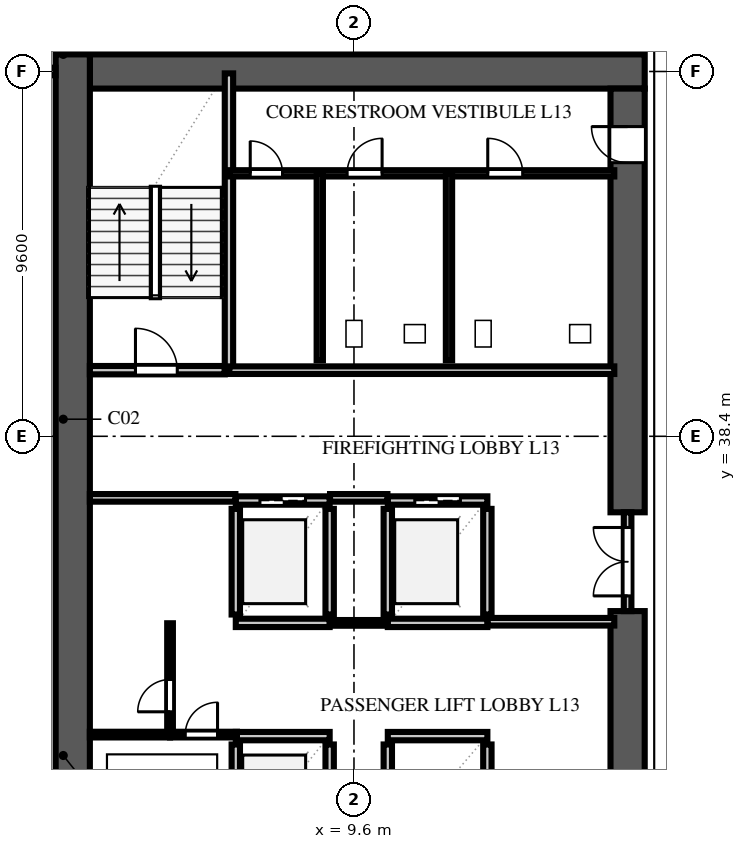
"""IFC4 building model, lengths in metres.
Left out: names, types, materials, properties, quantities, classifications, styles, units other than length and angle.
Written with IfcOpenShell. Run it as: python <this file> out.ifc"""

import sys

from ifc_helpers import new_model, si_unit, direction, frame, frame_2d, origin, place, context, subcontext, project, spatial, rectangle, extrude, element, fill, save


model = new_model("IFC4")
c1 = context("Model", 3, precision=1e-05, world=origin(), true_north=direction((0.0, 1.0)))
c2 = subcontext(c1, "Body", "Model", "MODEL_VIEW")
j1 = project(units=[si_unit("LENGTHUNIT", "METRE"), si_unit("PLANEANGLEUNIT", "RADIAN")], contexts=[c1])
p1 = place(None, origin())
s1 = spatial("IfcSite", under=j1, at=p1, CompositionType="ELEMENT")
p2 = place(p1, origin())
s2 = spatial("IfcBuilding", under=s1, at=p2, CompositionType="ELEMENT")
p3 = place(p2, frame((0.0, 0.0, 54.6)))
s3 = spatial("IfcBuildingStorey", under=s2, at=p3, CompositionType="ELEMENT", Elevation=54.6)
p4 = place(p3, frame((2.65, 48.0, 0.0), z_axis=(0.0, 0.0, 1.0), x_axis=(1.0, 0.0, 0.0)))
e1 = element("IfcWall", 1, at=p4, inside=s3, PredefinedType="SHEAR", context=c2, shape_type="SweptSolid", body=[
    extrude(rectangle(XDim=14.6, YDim=0.9, at=frame_2d((7.3, 0.0))), origin(), (0.0, 0.0, 1.0), 3.54),
])
p5 = place(p3, frame((2.2, 9.15, 0.0), z_axis=(0.0, 0.0, 1.0), x_axis=(0.0, 1.0, 0.0)))
e2 = element("IfcWall", 2, at=p5, inside=s3, PredefinedType="SHEAR", context=c2, shape_type="SweptSolid", body=[
    extrude(rectangle(XDim=39.3, YDim=0.9, at=frame_2d((19.65, 0.0))), origin(), (0.0, 0.0, 1.0), 3.54),
])
p6 = place(p3, frame((16.8, 26.0, 0.0), z_axis=(0.0, 0.0, 1.0), x_axis=(0.0, 1.0, 0.0)))
e3 = element("IfcWall", 3, at=p6, inside=s3, PredefinedType="SHEAR", context=c2, shape_type="SweptSolid", body=[
    extrude(rectangle(XDim=7.8, YDim=0.9, at=frame_2d((3.9, 0.0))), origin(), (0.0, 0.0, 1.0), 3.54),
])
p7 = place(p3, frame((16.8, 36.4, 0.0), z_axis=(0.0, 0.0, 1.0), x_axis=(0.0, 1.0, 0.0)))
e4 = element("IfcWall", 4, at=p7, inside=s3, PredefinedType="SHEAR", context=c2, shape_type="SweptSolid", body=[
    extrude(rectangle(XDim=11.15, YDim=0.9, at=frame_2d((5.575, 0.0))), origin(), (0.0, 0.0, 1.0), 3.54),
])
p8 = place(p7, frame((9.2, 0.0, 0.0)))
e5 = element("IfcOpeningElement", 5, at=p8, cuts=e4, PredefinedType="OPENING", context=c2, shape_type="SweptSolid", body=[
    extrude(rectangle(XDim=0.95, YDim=2.15, at=frame_2d((0.475, 1.075))), frame((0.0, 0.462, 0.0), z_axis=(0.0, -1.0, 0.0), x_axis=(1.0, 0.0, 0.0)), (0.0, 0.0, 1.0), 0.924),
])
p9 = place(p3, frame((2.65, 40.14, 0.0), z_axis=(0.0, 0.0, 1.0), x_axis=(1.0, 0.0, 0.0)))
e6 = element("IfcWall", 6, at=p9, inside=s3, PredefinedType="SOLIDWALL", context=c2, shape_type="SweptSolid", body=[
    extrude(rectangle(XDim=3.55, YDim=0.22, at=frame_2d((1.775, 0.0))), origin(), (0.0, 0.0, 1.0), 3.54),
])
p10 = place(p9, frame((1.2, 0.0, 0.0)))
e7 = element("IfcOpeningElement", 7, at=p10, cuts=e6, PredefinedType="OPENING", context=c2, shape_type="SweptSolid", body=[
    extrude(rectangle(XDim=1.1, YDim=2.2, at=frame_2d((0.55, 1.1))), frame((0.0, 0.122, 0.0), z_axis=(0.0, -1.0, 0.0), x_axis=(1.0, 0.0, 0.0)), (0.0, 0.0, 1.0), 0.244),
])
p11 = place(p3, frame((6.31, 40.14, 0.0), z_axis=(0.0, 0.0, 1.0), x_axis=(0.0, 1.0, 0.0)))
e8 = element("IfcWall", 8, at=p11, inside=s3, PredefinedType="SOLIDWALL", context=c2, shape_type="SweptSolid", body=[
    extrude(rectangle(XDim=7.81, YDim=0.22, at=frame_2d((3.905, 0.0))), origin(), (0.0, 0.0, 1.0), 3.54),
])
p12 = place(p3, frame((6.49, 27.71, 0.0), z_axis=(0.0, 0.0, 1.0), x_axis=(0.0, 1.0, 0.0)))
e9 = element("IfcWall", 9, at=p12, inside=s3, PredefinedType="SOLIDWALL", context=c2, shape_type="SweptSolid", body=[
    extrude(rectangle(XDim=2.58, YDim=0.22, at=frame_2d((1.29, 0.0))), origin(), (0.0, 0.0, 1.0), 3.54),
])
p13 = place(p3, frame((8.96, 27.71, 0.0), z_axis=(0.0, 0.0, 1.0), x_axis=(0.0, 1.0, 0.0)))
e10 = element("IfcWall", 10, at=p13, inside=s3, PredefinedType="SOLIDWALL", context=c2, shape_type="SweptSolid", body=[
    extrude(rectangle(XDim=2.58, YDim=0.22, at=frame_2d((1.29, 0.0))), origin(), (0.0, 0.0, 1.0), 3.54),
])
p14 = place(p13, frame((0.74, 0.0, 0.0)))
e11 = element("IfcOpeningElement", 11, at=p14, cuts=e10, PredefinedType="OPENING", context=c2, shape_type="SweptSolid", body=[
    extrude(rectangle(XDim=1.1, YDim=2.2, at=frame_2d((0.55, 1.1))), frame((0.0, 0.122, 0.0), z_axis=(0.0, -1.0, 0.0), x_axis=(1.0, 0.0, 0.0)), (0.0, 0.0, 1.0), 0.244),
])
p15 = place(p3, frame((6.49, 30.51, 0.0), z_axis=(0.0, 0.0, 1.0), x_axis=(1.0, 0.0, 0.0)))
e12 = element("IfcWall", 12, at=p15, inside=s3, PredefinedType="SOLIDWALL", context=c2, shape_type="SweptSolid", body=[
    extrude(rectangle(XDim=2.47, YDim=0.22, at=frame_2d((1.235, 0.0))), origin(), (0.0, 0.0, 1.0), 3.54),
])
for number, where, z_axis, x_axis in (
    (13, (10.49, 27.71, 0.0), (0.0, 0.0, 1.0), (0.0, 1.0, 0.0)),
    (14, (13.11, 27.71, 0.0), (0.0, 0.0, 1.0), (0.0, 1.0, 0.0)),
):
    element("IfcWall", number, at=place(p3, frame(where, z_axis=z_axis, x_axis=x_axis)), inside=s3, PredefinedType="SOLIDWALL", context=c2, shape_type="SweptSolid", body=[
        extrude(rectangle(XDim=2.58, YDim=0.22, at=frame_2d((1.29, 0.0))), origin(), (0.0, 0.0, 1.0), 3.54),
    ])
p16 = place(p3, frame((10.49, 30.51, 0.0), z_axis=(0.0, 0.0, 1.0), x_axis=(1.0, 0.0, 0.0)))
e15 = element("IfcWall", 15, at=p16, inside=s3, PredefinedType="SOLIDWALL", context=c2, shape_type="SweptSolid", body=[
    extrude(rectangle(XDim=2.62, YDim=0.22, at=frame_2d((1.31, 0.0))), origin(), (0.0, 0.0, 1.0), 3.54),
])
for number, where, z_axis, x_axis in (
    (16, (6.49, 33.71, 0.0), (0.0, 0.0, 1.0), (0.0, 1.0, 0.0)),
    (17, (8.96, 33.71, 0.0), (0.0, 0.0, 1.0), (0.0, 1.0, 0.0)),
):
    element("IfcWall", number, at=place(p3, frame(where, z_axis=z_axis, x_axis=x_axis)), inside=s3, PredefinedType="SOLIDWALL", context=c2, shape_type="SweptSolid", body=[
        extrude(rectangle(XDim=2.78, YDim=0.22, at=frame_2d((1.39, 0.0))), origin(), (0.0, 0.0, 1.0), 3.54),
    ])
p17 = place(p3, frame((6.49, 33.49, 0.0), z_axis=(0.0, 0.0, 1.0), x_axis=(1.0, 0.0, 0.0)))
e18 = element("IfcWall", 18, at=p17, inside=s3, PredefinedType="SOLIDWALL", context=c2, shape_type="SweptSolid", body=[
    extrude(rectangle(XDim=2.47, YDim=0.22, at=frame_2d((1.235, 0.0))), origin(), (0.0, 0.0, 1.0), 3.54),
])
p18 = place(p3, frame((6.49, 36.71, 0.0), z_axis=(0.0, 0.0, 1.0), x_axis=(1.0, 0.0, 0.0)))
e19 = element("IfcWall", 19, at=p18, inside=s3, PredefinedType="SOLIDWALL", context=c2, shape_type="SweptSolid", body=[
    extrude(rectangle(XDim=2.47, YDim=0.22, at=frame_2d((1.235, 0.0))), origin(), (0.0, 0.0, 1.0), 3.54),
])
p19 = place(p18, frame((0.635, 0.0, 0.0)))
e20 = element("IfcOpeningElement", 20, at=p19, cuts=e19, PredefinedType="OPENING", context=c2, shape_type="SweptSolid", body=[
    extrude(rectangle(XDim=1.2, YDim=2.2, at=frame_2d((0.6, 1.1))), frame((0.0, 0.122, 0.0), z_axis=(0.0, -1.0, 0.0), x_axis=(1.0, 0.0, 0.0)), (0.0, 0.0, 1.0), 0.244),
])
for number, where, z_axis, x_axis in (
    (21, (10.49, 33.71, 0.0), (0.0, 0.0, 1.0), (0.0, 1.0, 0.0)),
    (22, (13.11, 33.71, 0.0), (0.0, 0.0, 1.0), (0.0, 1.0, 0.0)),
):
    element("IfcWall", number, at=place(p3, frame(where, z_axis=z_axis, x_axis=x_axis)), inside=s3, PredefinedType="SOLIDWALL", context=c2, shape_type="SweptSolid", body=[
        extrude(rectangle(XDim=2.78, YDim=0.22, at=frame_2d((1.39, 0.0))), origin(), (0.0, 0.0, 1.0), 3.54),
    ])
p20 = place(p3, frame((10.49, 33.49, 0.0), z_axis=(0.0, 0.0, 1.0), x_axis=(1.0, 0.0, 0.0)))
e23 = element("IfcWall", 23, at=p20, inside=s3, PredefinedType="SOLIDWALL", context=c2, shape_type="SweptSolid", body=[
    extrude(rectangle(XDim=2.62, YDim=0.22, at=frame_2d((1.31, 0.0))), origin(), (0.0, 0.0, 1.0), 3.54),
])
p21 = place(p3, frame((10.49, 36.71, 0.0), z_axis=(0.0, 0.0, 1.0), x_axis=(1.0, 0.0, 0.0)))
e24 = element("IfcWall", 24, at=p21, inside=s3, PredefinedType="SOLIDWALL", context=c2, shape_type="SweptSolid", body=[
    extrude(rectangle(XDim=2.62, YDim=0.22, at=frame_2d((1.31, 0.0))), origin(), (0.0, 0.0, 1.0), 3.54),
])
p22 = place(p21, frame((0.71, 0.0, 0.0)))
e25 = element("IfcOpeningElement", 25, at=p22, cuts=e24, PredefinedType="OPENING", context=c2, shape_type="SweptSolid", body=[
    extrude(rectangle(XDim=1.2, YDim=2.2, at=frame_2d((0.6, 1.1))), frame((0.0, 0.122, 0.0), z_axis=(0.0, -1.0, 0.0), x_axis=(1.0, 0.0, 0.0)), (0.0, 0.0, 1.0), 0.244),
])
p23 = place(p3, frame((2.65, 36.78, 0.0), z_axis=(0.0, 0.0, 1.0), x_axis=(1.0, 0.0, 0.0)))
e26 = element("IfcWall", 26, at=p23, inside=s3, PredefinedType="SOLIDWALL", context=c2, shape_type="SweptSolid", body=[
    extrude(rectangle(XDim=3.83, YDim=0.2, at=frame_2d((1.915, 0.0))), origin(), (0.0, 0.0, 1.0), 3.54),
])
p24 = place(p3, frame((8.97, 36.78, 0.0), z_axis=(0.0, 0.0, 1.0), x_axis=(1.0, 0.0, 0.0)))
e27 = element("IfcWall", 27, at=p24, inside=s3, PredefinedType="SOLIDWALL", context=c2, shape_type="SweptSolid", body=[
    extrude(rectangle(XDim=1.51, YDim=0.2, at=frame_2d((0.755, 0.0))), origin(), (0.0, 0.0, 1.0), 3.54),
])
p25 = place(p3, frame((13.12, 33.52, 0.0), z_axis=(0.0, 0.0, 1.0), x_axis=(1.0, 0.0, 0.0)))
e28 = element("IfcWall", 28, at=p25, inside=s3, PredefinedType="SOLIDWALL", context=c2, shape_type="SweptSolid", body=[
    extrude(rectangle(XDim=3.33, YDim=0.2, at=frame_2d((1.665, 0.0))), origin(), (0.0, 0.0, 1.0), 3.54),
])
p26 = place(p3, frame((6.32, 40.14, 0.0), z_axis=(0.0, 0.0, 1.0), x_axis=(1.0, 0.0, 0.0)))
e29 = element("IfcWall", 29, at=p26, inside=s3, PredefinedType="SOLIDWALL", context=c2, shape_type="SweptSolid", body=[
    extrude(rectangle(XDim=10.13, YDim=0.2, at=frame_2d((5.065, 0.0))), origin(), (0.0, 0.0, 1.0), 3.54),
])
p27 = place(p3, frame((16.8, 33.8, 0.0), z_axis=(0.0, 0.0, 1.0), x_axis=(0.0, 1.0, 0.0)))
e30 = element("IfcWall", 30, at=p27, inside=s3, PredefinedType="SOLIDWALL", context=c2, shape_type="SweptSolid", body=[
    extrude(rectangle(XDim=2.6, YDim=0.2, at=frame_2d((1.3, 0.0))), origin(), (0.0, 0.0, 1.0), 3.54),
])
p28 = place(p27, frame((0.4, 0.0, 0.0)))
e31 = element("IfcOpeningElement", 31, at=p28, cuts=e30, PredefinedType="OPENING", context=c2, shape_type="SweptSolid", body=[
    extrude(rectangle(XDim=1.8, YDim=2.2, at=frame_2d((0.9, 1.1))), frame((0.0, 0.112, 0.0), z_axis=(0.0, -1.0, 0.0), x_axis=(1.0, 0.0, 0.0)), (0.0, 0.0, 1.0), 0.224),
])
p29 = place(p3, frame((8.965, 33.49, 0.0), z_axis=(0.0, 0.0, 1.0), x_axis=(1.0, 0.0, 0.0)))
e32 = element("IfcWall", 32, at=p29, inside=s3, PredefinedType="PARTITIONING", context=c2, shape_type="SweptSolid", body=[
    extrude(rectangle(XDim=1.52, YDim=0.15, at=frame_2d((0.76, 0.0))), origin(), (0.0, 0.0, 1.0), 3.54),
])
p30 = place(p3, frame((4.76, 30.55, 0.0), z_axis=(0.0, 0.0, 1.0), x_axis=(0.0, 1.0, 0.0)))
e33 = element("IfcWall", 33, at=p30, inside=s3, PredefinedType="PARTITIONING", context=c2, shape_type="SweptSolid", body=[
    extrude(rectangle(XDim=2.93, YDim=0.15, at=frame_2d((1.465, 0.0))), origin(), (0.0, 0.0, 1.0), 3.54),
])
p31 = place(p30, frame((0.6, 0.0, 0.0)))
e34 = element("IfcOpeningElement", 34, at=p31, cuts=e33, PredefinedType="OPENING", context=c2, shape_type="SweptSolid", body=[
    extrude(rectangle(XDim=0.85, YDim=2.1, at=frame_2d((0.425, 1.05))), frame((0.0, 0.087, 0.0), z_axis=(0.0, -1.0, 0.0), x_axis=(1.0, 0.0, 0.0)), (0.0, 0.0, 1.0), 0.174),
])
p32 = place(p3, frame((4.76, 30.55, 0.0), z_axis=(0.0, 0.0, 1.0), x_axis=(1.0, 0.0, 0.0)))
e35 = element("IfcWall", 35, at=p32, inside=s3, PredefinedType="PARTITIONING", context=c2, shape_type="SweptSolid", body=[
    extrude(rectangle(XDim=1.76, YDim=0.15, at=frame_2d((0.88, 0.0))), origin(), (0.0, 0.0, 1.0), 3.54),
])
p33 = place(p32, frame((0.4, 0.0, 0.0)))
e36 = element("IfcOpeningElement", 36, at=p33, cuts=e35, PredefinedType="OPENING", context=c2, shape_type="SweptSolid", body=[
    extrude(rectangle(XDim=0.85, YDim=2.1, at=frame_2d((0.425, 1.05))), frame((0.0, 0.087, 0.0), z_axis=(0.0, -1.0, 0.0), x_axis=(1.0, 0.0, 0.0)), (0.0, 0.0, 1.0), 0.174),
])
p34 = place(p3, frame((2.65, 30.55, 0.0), z_axis=(0.0, 0.0, 1.0), x_axis=(1.0, 0.0, 0.0)))
e37 = element("IfcWall", 37, at=p34, inside=s3, PredefinedType="PARTITIONING", context=c2, shape_type="SweptSolid", body=[
    extrude(rectangle(XDim=2.11, YDim=0.15, at=frame_2d((1.055, 0.0))), origin(), (0.0, 0.0, 1.0), 3.54),
])
p35 = place(p3, frame((6.32, 45.32, 0.0), z_axis=(0.0, 0.0, 1.0), x_axis=(1.0, 0.0, 0.0)))
e38 = element("IfcWall", 38, at=p35, inside=s3, PredefinedType="PLUMBINGWALL", context=c2, shape_type="SweptSolid", body=[
    extrude(rectangle(XDim=10.13, YDim=0.165, at=frame_2d((5.065, 0.0))), origin(), (0.0, 0.0, 1.0), 3.54),
])
p36 = place(p35, frame((0.55, 0.0, 0.0)))
e39 = element("IfcOpeningElement", 39, at=p36, cuts=e38, PredefinedType="OPENING", context=c2, shape_type="SweptSolid", body=[
    extrude(rectangle(XDim=0.85, YDim=2.1, at=frame_2d((0.425, 1.05))), frame((0.0, 0.094, 0.0), z_axis=(0.0, -1.0, 0.0), x_axis=(1.0, 0.0, 0.0)), (0.0, 0.0, 1.0), 0.189),
])
p37 = place(p35, frame((3.1, 0.0, 0.0)))
e40 = element("IfcOpeningElement", 40, at=p37, cuts=e38, PredefinedType="OPENING", context=c2, shape_type="SweptSolid", body=[
    extrude(rectangle(XDim=0.92, YDim=2.15, at=frame_2d((0.46, 1.075))), frame((0.0, 0.094, 0.0), z_axis=(0.0, -1.0, 0.0), x_axis=(1.0, 0.0, 0.0)), (0.0, 0.0, 1.0), 0.189),
])
p38 = place(p35, frame((6.8, 0.0, 0.0)))
e41 = element("IfcOpeningElement", 41, at=p38, cuts=e38, PredefinedType="OPENING", context=c2, shape_type="SweptSolid", body=[
    extrude(rectangle(XDim=0.92, YDim=2.15, at=frame_2d((0.46, 1.075))), frame((0.0, 0.094, 0.0), z_axis=(0.0, -1.0, 0.0), x_axis=(1.0, 0.0, 0.0)), (0.0, 0.0, 1.0), 0.189),
])
for number, where, z_axis, x_axis in (
    (42, (8.7, 40.4, 0.0), (0.0, 0.0, 1.0), (0.0, 1.0, 0.0)),
    (43, (12.1, 40.4, 0.0), (0.0, 0.0, 1.0), (0.0, 1.0, 0.0)),
):
    element("IfcWall", number, at=place(p3, frame(where, z_axis=z_axis, x_axis=x_axis)), inside=s3, PredefinedType="PLUMBINGWALL", context=c2, shape_type="SweptSolid", body=[
        extrude(rectangle(XDim=4.92, YDim=0.165, at=frame_2d((2.46, 0.0))), origin(), (0.0, 0.0, 1.0), 3.54),
    ])
p39 = place(p3, frame((0.85, 48.0, 0.0), z_axis=(0.0, 0.0, 1.0), x_axis=(1.0, 0.0, 0.0)))
e44 = element("IfcWall", 44, at=p39, inside=s3, PredefinedType="SOLIDWALL", context=c2, shape_type="SweptSolid", body=[
    extrude(rectangle(XDim=0.895, YDim=0.2, at=frame_2d((0.448, 0.0))), origin(), (0.0, 0.0, 1.0), 3.54),
])
p40 = place(p10, origin())
e45 = element("IfcDoor", 45, at=p40, inside=s3, OperationType="SINGLE_SWING_LEFT", PredefinedType="DOOR", context=c2, shape_type="SweptSolid", body=[
    extrude(rectangle(XDim=1.1, YDim=2.2, at=frame_2d((0.55, 1.1))), frame((0.0, 0.025, 0.0), z_axis=(0.0, -1.0, 0.0), x_axis=(1.0, 0.0, 0.0)), (0.0, 0.0, 1.0), 0.05),
])
fill(e7, e45)
p41 = place(p19, origin())
e46 = element("IfcDoor", 46, at=p41, inside=s3, OperationType="DOUBLE_DOOR_SLIDING", PredefinedType="DOOR", context=c2, shape_type="SweptSolid", body=[
    extrude(rectangle(XDim=1.2, YDim=2.2, at=frame_2d((0.6, 1.1))), frame((0.0, 0.025, 0.0), z_axis=(0.0, -1.0, 0.0), x_axis=(1.0, 0.0, 0.0)), (0.0, 0.0, 1.0), 0.05),
])
fill(e20, e46)
p42 = place(p22, origin())
e47 = element("IfcDoor", 47, at=p42, inside=s3, OperationType="DOUBLE_DOOR_SLIDING", PredefinedType="DOOR", context=c2, shape_type="SweptSolid", body=[
    extrude(rectangle(XDim=1.2, YDim=2.2, at=frame_2d((0.6, 1.1))), frame((0.0, 0.025, 0.0), z_axis=(0.0, -1.0, 0.0), x_axis=(1.0, 0.0, 0.0)), (0.0, 0.0, 1.0), 0.05),
])
fill(e25, e47)
p43 = place(p8, origin())
e48 = element("IfcDoor", 48, at=p43, inside=s3, OperationType="SINGLE_SWING_RIGHT", PredefinedType="DOOR", context=c2, shape_type="SweptSolid", body=[
    extrude(rectangle(XDim=0.95, YDim=2.15, at=frame_2d((0.475, 1.075))), frame((0.0, 0.025, 0.0), z_axis=(0.0, -1.0, 0.0), x_axis=(1.0, 0.0, 0.0)), (0.0, 0.0, 1.0), 0.05),
])
fill(e5, e48)
p44 = place(p28, origin())
e49 = element("IfcDoor", 49, at=p44, inside=s3, OperationType="DOUBLE_DOOR_SINGLE_SWING", PredefinedType="DOOR", context=c2, shape_type="SweptSolid", body=[
    extrude(rectangle(XDim=1.8, YDim=2.2, at=frame_2d((0.9, 1.1))), frame((0.0, 0.025, 0.0), z_axis=(0.0, -1.0, 0.0), x_axis=(1.0, 0.0, 0.0)), (0.0, 0.0, 1.0), 0.05),
])
fill(e31, e49)
p45 = place(p31, origin())
e50 = element("IfcDoor", 50, at=p45, inside=s3, OperationType="SINGLE_SWING_LEFT", PredefinedType="DOOR", context=c2, shape_type="SweptSolid", body=[
    extrude(rectangle(XDim=0.85, YDim=2.1, at=frame_2d((0.425, 1.05))), frame((0.0, 0.025, 0.0), z_axis=(0.0, -1.0, 0.0), x_axis=(1.0, 0.0, 0.0)), (0.0, 0.0, 1.0), 0.05),
])
fill(e34, e50)
p46 = place(p33, origin())
e51 = element("IfcDoor", 51, at=p46, inside=s3, OperationType="SINGLE_SWING_RIGHT", PredefinedType="DOOR", context=c2, shape_type="SweptSolid", body=[
    extrude(rectangle(XDim=0.85, YDim=2.1, at=frame_2d((0.425, 1.05))), frame((0.0, 0.025, 0.0), z_axis=(0.0, -1.0, 0.0), x_axis=(1.0, 0.0, 0.0)), (0.0, 0.0, 1.0), 0.05),
])
fill(e36, e51)
p47 = place(p36, origin())
e52 = element("IfcDoor", 52, at=p47, inside=s3, OperationType="SINGLE_SWING_LEFT", PredefinedType="DOOR", context=c2, shape_type="SweptSolid", body=[
    extrude(rectangle(XDim=0.85, YDim=2.1, at=frame_2d((0.425, 1.05))), frame((0.0, 0.025, 0.0), z_axis=(0.0, -1.0, 0.0), x_axis=(1.0, 0.0, 0.0)), (0.0, 0.0, 1.0), 0.05),
])
fill(e39, e52)
p48 = place(p37, origin())
e53 = element("IfcDoor", 53, at=p48, inside=s3, OperationType="SINGLE_SWING_RIGHT", PredefinedType="DOOR", context=c2, shape_type="SweptSolid", body=[
    extrude(rectangle(XDim=0.92, YDim=2.15, at=frame_2d((0.46, 1.075))), frame((0.0, 0.025, 0.0), z_axis=(0.0, -1.0, 0.0), x_axis=(1.0, 0.0, 0.0)), (0.0, 0.0, 1.0), 0.05),
])
fill(e40, e53)
p49 = place(p38, origin())
e54 = element("IfcDoor", 54, at=p49, inside=s3, OperationType="SINGLE_SWING_LEFT", PredefinedType="DOOR", context=c2, shape_type="SweptSolid", body=[
    extrude(rectangle(XDim=0.92, YDim=2.15, at=frame_2d((0.46, 1.075))), frame((0.0, 0.025, 0.0), z_axis=(0.0, -1.0, 0.0), x_axis=(1.0, 0.0, 0.0)), (0.0, 0.0, 1.0), 0.05),
])
fill(e41, e54)
save(model, sys.argv[1])
